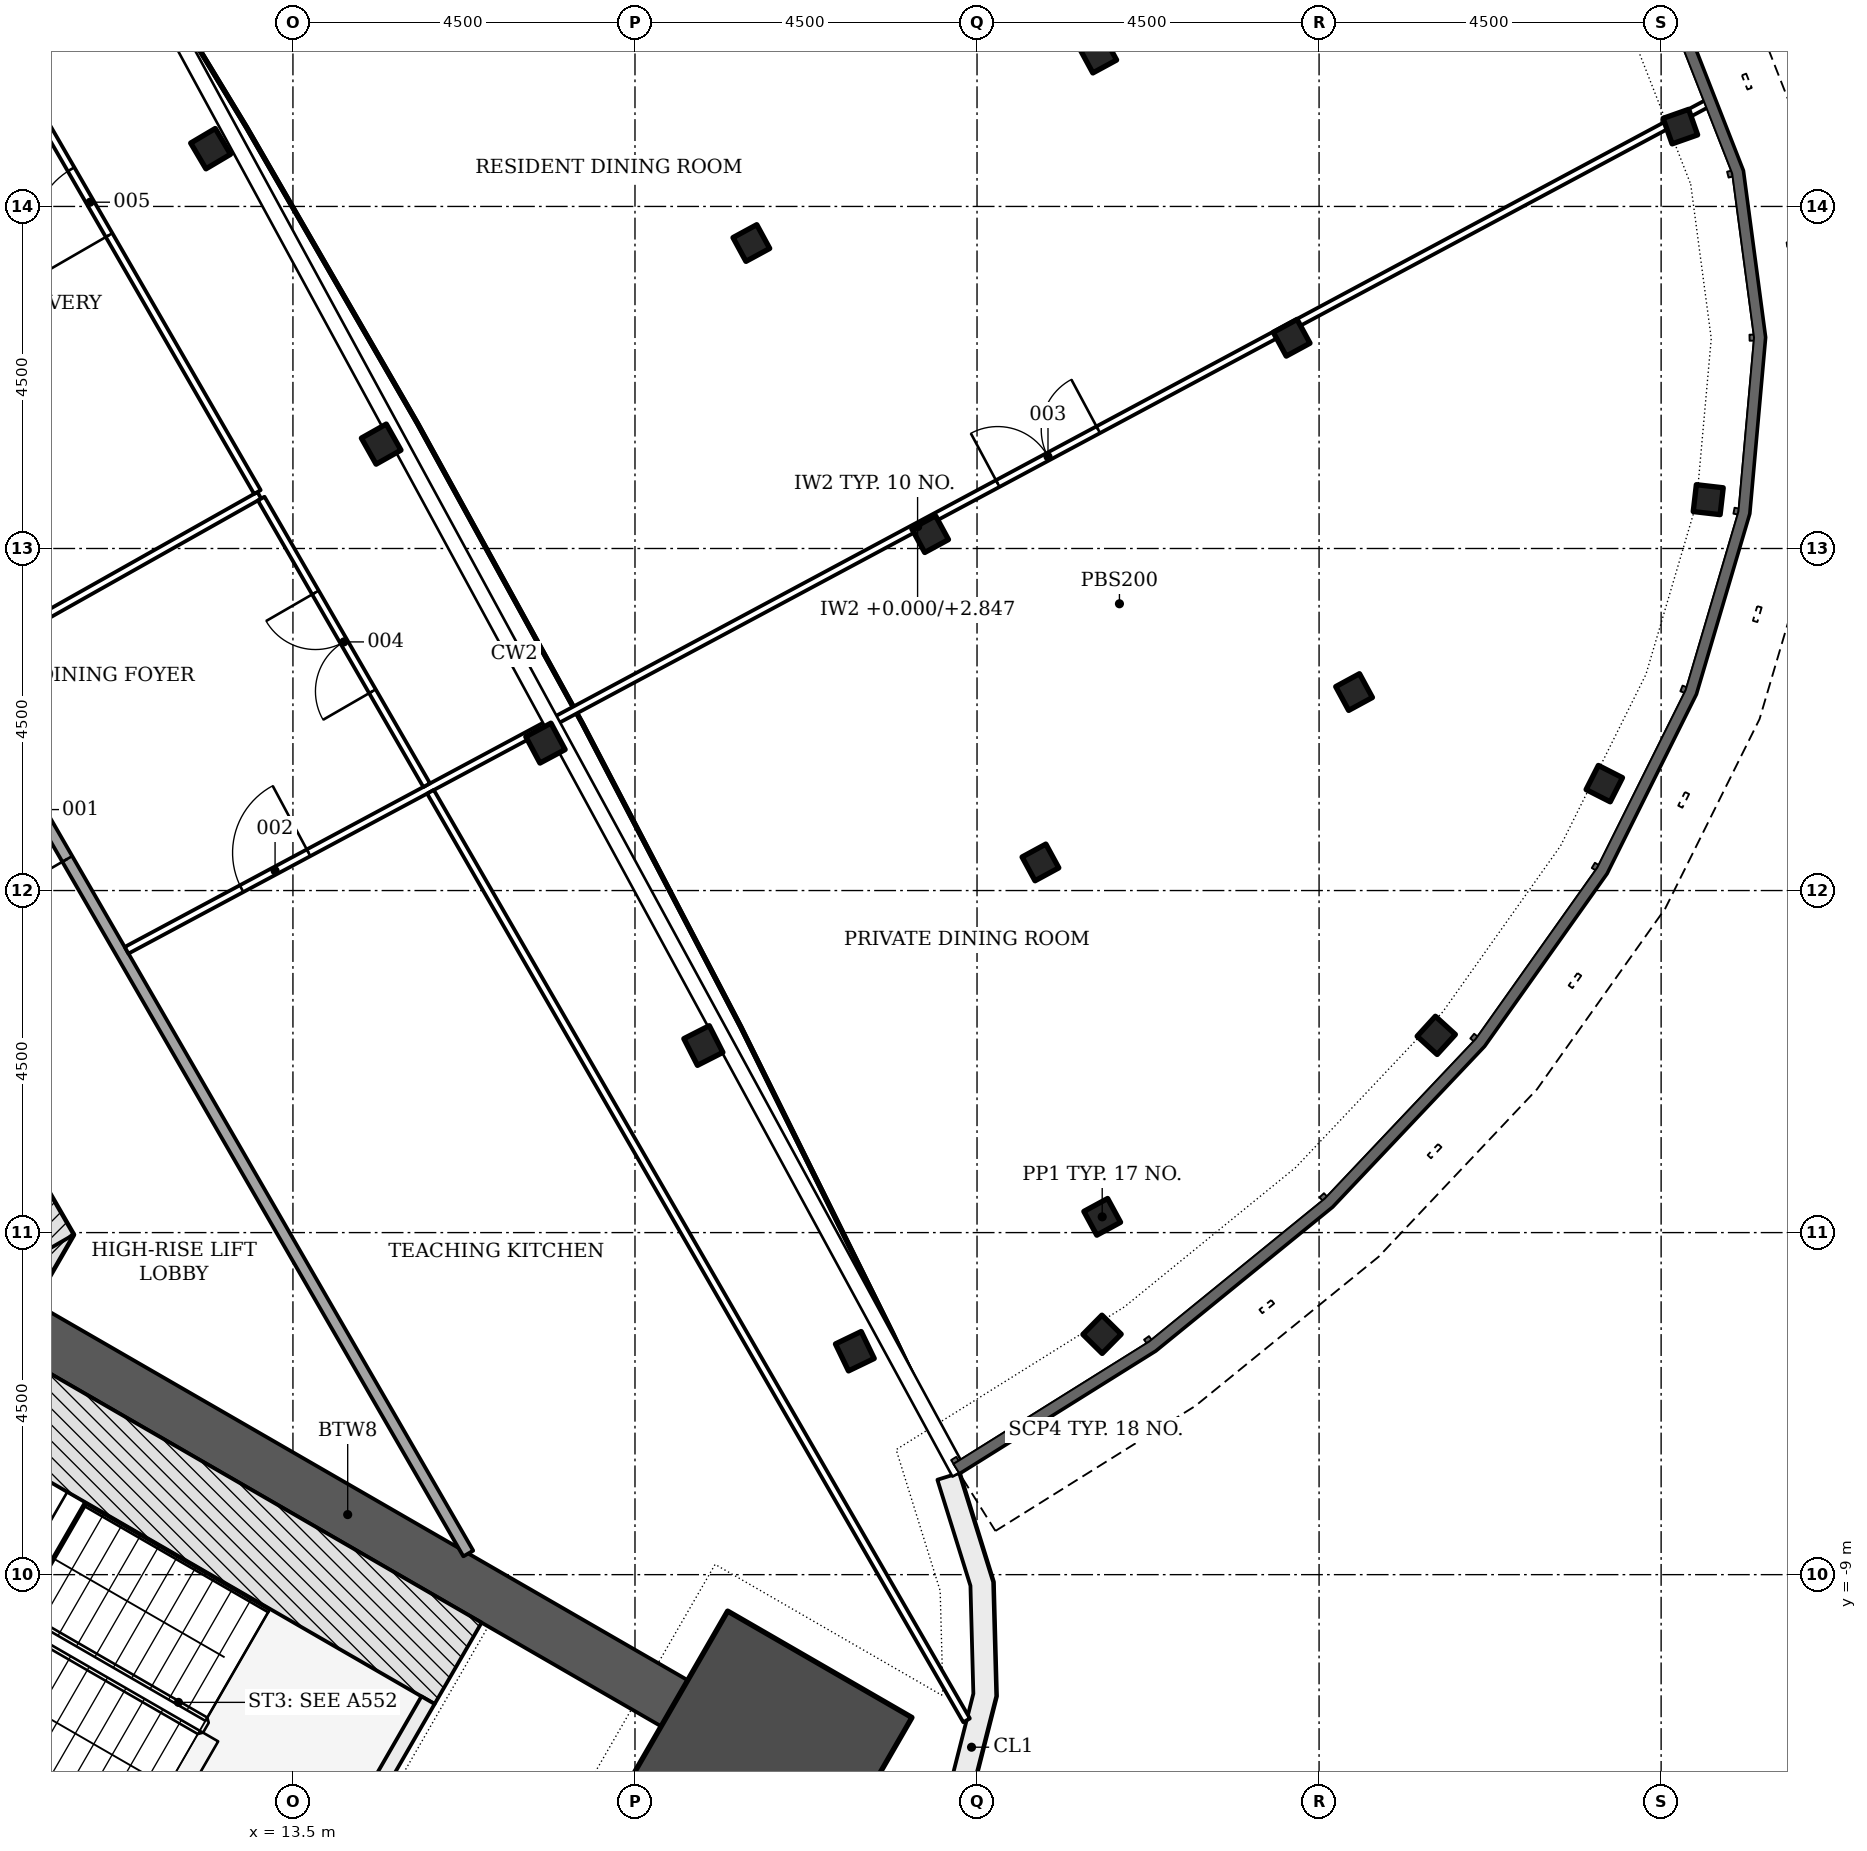
"""IFC4 building model, lengths in metres.
Left out: names, types, materials, properties, quantities, classifications, styles, units other than length and angle.
Written with IfcOpenShell. Run it as: python <this file> out.ifc"""

import sys

from ifc_helpers import new_model, si_unit, direction, frame, frame_2d, origin, origin_2d, place, context, subcontext, project, spatial, polyline, rectangle, hollow_rectangle, i_section, outline, extrude, element, fill, save


model = new_model("IFC4")
c1 = context("Model", 3, precision=1e-05, world=origin(), true_north=direction((0.0, 1.0)))
c2 = subcontext(c1, "Body", "Model", "MODEL_VIEW")
j1 = project(units=[si_unit("LENGTHUNIT", "METRE"), si_unit("PLANEANGLEUNIT", "RADIAN")], contexts=[c1])
p1 = place(None, origin())
s1 = spatial("IfcSite", under=j1, at=p1, CompositionType="ELEMENT")
p2 = place(p1, origin())
s2 = spatial("IfcBuilding", under=s1, at=p2, CompositionType="ELEMENT")
p3 = place(p2, frame((0.0, 0.0, 174.3)))
s3 = spatial("IfcBuildingStorey", under=s2, at=p3, CompositionType="ELEMENT", Elevation=174.3)
p4 = place(p3, frame((8.926, -6.753, -0.2), z_axis=(0.0, 0.0, 1.0), x_axis=(0.500042739161, 0.866000726912, 0.0)))
e1 = element("IfcWall", 1, at=p4, inside=s3, PredefinedType="SHEAR", context=c2, shape_type="SweptSolid", body=[
    extrude(rectangle(XDim=2.771, YDim=0.7, at=frame_2d((1.386, 0.0))), origin(), (0.0, 0.0, 1.0), 3.6),
])
p5 = place(p3, frame((10.311, -4.703, -0.2), z_axis=(0.0, 0.0, 1.0), x_axis=(-0.500001446645, 0.866024568562, 0.0)))
e2 = element("IfcWall", 2, at=p5, inside=s3, PredefinedType="SHEAR", context=c2, shape_type="SweptSolid", body=[
    extrude(rectangle(XDim=18.458, YDim=0.7, at=frame_2d((9.229, 0.0))), origin(), (0.0, 0.0, 1.0), 3.6),
])
p6 = place(p5, frame((4.379, 0.0, 0.2)))
e3 = element("IfcOpeningElement", 3, at=p6, cuts=e2, PredefinedType="OPENING", context=c2, shape_type="SweptSolid", body=[
    extrude(rectangle(XDim=1.1, YDim=2.1, at=frame_2d((0.55, 1.05))), frame((0.0, 0.36, 0.0), z_axis=(0.0, -1.0, 0.0), x_axis=(1.0, 0.0, 0.0)), (0.0, 0.0, 1.0), 0.72),
])
p7 = place(p5, frame((6.529, 0.0, 0.2)))
e4 = element("IfcOpeningElement", 4, at=p7, cuts=e2, PredefinedType="OPENING", context=c2, shape_type="SweptSolid", body=[
    extrude(rectangle(XDim=1.1, YDim=2.1, at=frame_2d((0.55, 1.05))), frame((0.0, 0.36, 0.0), z_axis=(0.0, -1.0, 0.0), x_axis=(1.0, 0.0, 0.0)), (0.0, 0.0, 1.0), 0.72),
])
p8 = place(p5, frame((8.679, 0.0, 0.2)))
e5 = element("IfcOpeningElement", 5, at=p8, cuts=e2, PredefinedType="OPENING", context=c2, shape_type="SweptSolid", body=[
    extrude(rectangle(XDim=1.1, YDim=2.1, at=frame_2d((0.55, 1.05))), frame((0.0, 0.36, 0.0), z_axis=(0.0, -1.0, 0.0), x_axis=(1.0, 0.0, 0.0)), (0.0, 0.0, 1.0), 0.72),
])
p9 = place(p5, frame((10.829, 0.0, 0.2)))
e6 = element("IfcOpeningElement", 6, at=p9, cuts=e2, PredefinedType="OPENING", context=c2, shape_type="SweptSolid", body=[
    extrude(rectangle(XDim=1.1, YDim=2.1, at=frame_2d((0.55, 1.05))), frame((0.0, 0.36, 0.0), z_axis=(0.0, -1.0, 0.0), x_axis=(1.0, 0.0, 0.0)), (0.0, 0.0, 1.0), 0.72),
])
p10 = place(p5, frame((12.979, 0.0, 0.2)))
e7 = element("IfcOpeningElement", 7, at=p10, cuts=e2, PredefinedType="OPENING", context=c2, shape_type="SweptSolid", body=[
    extrude(rectangle(XDim=1.1, YDim=2.1, at=frame_2d((0.55, 1.05))), frame((0.0, 0.36, 0.0), z_axis=(0.0, -1.0, 0.0), x_axis=(1.0, 0.0, 0.0)), (0.0, 0.0, 1.0), 0.72),
])
p11 = place(p3, frame((9.922, -5.728, -0.2), z_axis=(0.0, 0.0, 1.0), x_axis=(0.866029553954, -0.499992811627, 0.0)))
e8 = element("IfcWall", 8, at=p11, inside=s3, PredefinedType="SHEAR", context=c2, shape_type="SweptSolid", body=[
    extrude(rectangle(XDim=9.927, YDim=0.7, at=frame_2d((4.964, 0.0))), origin(), (0.0, 0.0, 1.0), 3.6),
])
p12 = place(p3, frame((19.731, -11.392, -0.2), z_axis=(0.0, 0.0, 1.0), x_axis=(0.866025403784, -0.5, 0.0)))
e9 = element("IfcColumn", 9, at=p12, inside=s3, PredefinedType="COLUMN", context=c2, shape_type="SweptSolid", body=[
    extrude(rectangle(XDim=2.8, YDim=2.8, at=origin_2d()), origin(), (0.0, 0.0, 1.0), 3.6),
])
for number, where, z_axis, x_axis in (
    (10, (20.893, -6.061, -0.2), (0.0, 0.0, 1.0), (-0.434, 0.901, 0.0)),
    (11, (18.9, -2.039, -0.2), (0.0, 0.0, 1.0), (-0.453, 0.891, 0.0)),
    (12, (16.822, 1.939, -0.2), (0.0, 0.0, 1.0), (-0.472, 0.881, 0.0)),
    (13, (14.661, 5.873, -0.2), (0.0, 0.0, 1.0), (-0.491, 0.871, 0.0)),
    (14, (12.417, 9.76, -0.2), (0.0, 0.0, 1.0), (-0.509, 0.861, 0.0)),
):
    element("IfcColumn", number, at=place(p3, frame(where, z_axis=z_axis, x_axis=x_axis)), inside=s3, PredefinedType="COLUMN", context=c2, shape_type="SweptSolid", body=[
        extrude(i_section(OverallWidth=0.394, OverallDepth=0.376, WebThickness=0.017, FlangeThickness=0.028, FilletRadius=0.015, at=origin_2d()), origin(), (0.0, 0.0, 1.0), 3.6),
    ])
for number, where, z_axis, x_axis in (
    (15, (24.147, -4.293, -0.2), (0.0, 0.0, 1.0), (0.879, 0.477, 0.0)),
    (16, (23.334, 0.37, -0.2), (0.0, 0.0, 1.0), (0.879, 0.477, 0.0)),
    (17, (27.46, 2.611, -0.2), (0.0, 0.0, 1.0), (0.879, 0.477, 0.0)),
    (18, (21.883, 4.689, -0.2), (0.0, 0.0, 1.0), (0.879, 0.477, 0.0)),
    (19, (26.639, 7.272, -0.2), (0.0, 0.0, 1.0), (0.879, 0.477, 0.0)),
    (20, (19.531, 8.519, -0.2), (0.0, 0.0, 1.0), (0.879, 0.477, 0.0)),
    (21, (24.095, 10.998, -0.2), (0.0, 0.0, 1.0), (0.879, 0.477, 0.0)),
    (22, (24.145, -5.838, -0.2), (0.0, 0.0, 1.0), (0.703, 0.711, 0.0)),
    (23, (28.542, -1.905, -0.2), (0.0, 0.0, 1.0), (0.674, 0.739, 0.0)),
    (24, (30.752, 1.406, -0.2), (0.0, 0.0, 1.0), (0.453, 0.892, 0.0)),
    (25, (32.12, 5.142, -0.2), (0.0, 0.0, 1.0), (0.115, 0.993, 0.0)),
    (26, (31.753, 10.05, -0.2), (0.0, 0.0, 1.0), (-0.332, 0.943, 0.0)),
):
    element("IfcColumn", number, at=place(p3, frame(where, z_axis=z_axis, x_axis=x_axis)), inside=s3, PredefinedType="COLUMN", context=c2, shape_type="SweptSolid", body=[
        extrude(hollow_rectangle(XDim=0.356, YDim=0.356, WallThickness=0.013, at=origin_2d()), origin(), (0.0, 0.0, 1.0), 3.6),
    ])
p13 = place(p3, origin())
e27 = element("IfcWall", 27, at=p13, inside=s3, PredefinedType="NOTDEFINED", context=c2, shape_type="SweptSolid", body=[
    extrude(outline(polyline([(15.736, -15.612), (17.768, -15.451), (19.234, -15.121), (20.555, -14.405), (21.632, -13.357), (22.383, -12.055), (22.753, -10.599), (22.712, -9.097), (22.265, -7.662), (21.979, -7.751), (22.413, -9.146), (22.452, -10.565), (22.103, -11.941), (21.393, -13.171), (20.376, -14.161), (19.128, -14.837), (17.723, -15.154), (15.712, -15.312), (15.736, -15.612)])), origin(), (0.0, 0.0, 1.0), 3.3),
])
p14 = place(p3, frame((7.304, -10.262, -0.2), z_axis=(0.0, 0.0, 1.0), x_axis=(0.866026594901, -0.49999793692, 0.0)))
e28 = element("IfcWall", 28, at=p14, inside=s3, PredefinedType="SHEAR", context=c2, shape_type="SweptSolid", body=[
    extrude(rectangle(XDim=5.6, YDim=0.2, at=frame_2d((2.8, 0.0))), origin(), (0.0, 0.0, 1.0), 3.6),
])
p15 = place(p14, frame((0.45, 0.0, 0.2)))
e29 = element("IfcOpeningElement", 29, at=p15, cuts=e28, PredefinedType="OPENING", context=c2, shape_type="SweptSolid", body=[
    extrude(rectangle(XDim=1.2, YDim=2.1, at=frame_2d((0.6, 1.05))), frame((0.0, 0.11, 0.0), z_axis=(0.0, -1.0, 0.0), x_axis=(1.0, 0.0, 0.0)), (0.0, 0.0, 1.0), 0.22),
])
p16 = place(p3, frame((9.438, -6.566, -0.2), z_axis=(0.0, 0.0, 1.0), x_axis=(0.866026919366, -0.499997374926, 0.0)))
e30 = element("IfcWall", 30, at=p16, inside=s3, PredefinedType="SHEAR", context=c2, shape_type="SweptSolid", body=[
    extrude(rectangle(XDim=7.2, YDim=1.236, at=frame_2d((3.6, 0.0))), origin(), (0.0, 0.0, 1.0), 3.6),
])
p17 = place(p3, frame((0.0, 0.0, -0.2)))
e31 = element("IfcWall", 31, at=p17, inside=s3, PredefinedType="SHEAR", context=c2, shape_type="SweptSolid", body=[
    extrude(outline(polyline([(12.104, -13.149), (14.289, -12.563), (15.364, -10.701), (15.191, -10.601), (14.157, -12.392), (12.132, -12.934), (12.204, -12.976), (12.204, -12.976), (12.204, -12.976), (12.204, -12.976), (12.204, -12.976), (12.204, -12.976), (12.204, -12.976), (12.204, -12.976), (12.204, -12.976), (12.204, -12.976), (12.204, -12.976), (12.204, -12.976), (12.204, -12.976), (12.204, -12.976), (12.204, -12.976), (12.204, -12.976), (12.204, -12.976), (12.104, -13.149)])), origin(), (0.0, 0.0, 1.0), 3.6),
])
p18 = place(p3, frame((15.807, -8.722, 0.0), z_axis=(0.0, 0.0, 1.0), x_axis=(-0.500001078133, 0.866024781323, 0.0)))
e32 = element("IfcWall", 32, at=p18, inside=s3, PredefinedType="PARTITIONING", context=c2, shape_type="SweptSolid", body=[
    extrude(rectangle(XDim=23.185, YDim=0.15, at=frame_2d((11.592, 0.0))), origin(), (0.0, 0.0, 1.0), 2.847),
])
p19 = place(p18, frame((10.551, 0.0, 0.0)))
e33 = element("IfcOpeningElement", 33, at=p19, cuts=e32, PredefinedType="OPENING", context=c2, shape_type="SweptSolid", body=[
    extrude(rectangle(XDim=1.5, YDim=2.1, at=frame_2d((0.75, 1.05))), frame((0.0, 0.085, 0.0), z_axis=(0.0, -1.0, 0.0), x_axis=(1.0, 0.0, 0.0)), (0.0, 0.0, 1.0), 0.17),
])
p20 = place(p18, frame((17.335, 0.0, 0.0)))
e34 = element("IfcOpeningElement", 34, at=p20, cuts=e32, PredefinedType="OPENING", context=c2, shape_type="SweptSolid", body=[
    extrude(rectangle(XDim=1.0, YDim=2.1, at=frame_2d((0.5, 1.05))), frame((0.0, 0.085, 0.0), z_axis=(0.0, -1.0, 0.0), x_axis=(1.0, 0.0, 0.0)), (0.0, 0.0, 1.0), 0.17),
])
p21 = place(p3, frame((11.312, -0.786, 0.0), z_axis=(0.0, 0.0, 1.0), x_axis=(0.881471822947, 0.472236620087, 0.0)))
e35 = element("IfcWall", 35, at=p21, inside=s3, PredefinedType="PARTITIONING", context=c2, shape_type="SweptSolid", body=[
    extrude(rectangle(XDim=23.611, YDim=0.1, at=frame_2d((11.806, 0.0))), origin(), (0.0, 0.0, 1.0), 2.847),
])
p22 = place(p21, frame((1.716, 0.0, 0.0)))
e36 = element("IfcOpeningElement", 36, at=p22, cuts=e35, PredefinedType="OPENING", context=c2, shape_type="SweptSolid", body=[
    extrude(rectangle(XDim=1.0, YDim=2.1, at=frame_2d((0.5, 1.05))), frame((0.0, 0.06, 0.0), z_axis=(0.0, -1.0, 0.0), x_axis=(1.0, 0.0, 0.0)), (0.0, 0.0, 1.0), 0.12),
])
p23 = place(p21, frame((13.002, 0.0, 0.0)))
e37 = element("IfcOpeningElement", 37, at=p23, cuts=e35, PredefinedType="OPENING", context=c2, shape_type="SweptSolid", body=[
    extrude(rectangle(XDim=1.5, YDim=2.1, at=frame_2d((0.75, 1.05))), frame((0.0, 0.06, 0.0), z_axis=(0.0, -1.0, 0.0), x_axis=(1.0, 0.0, 0.0)), (0.0, 0.0, 1.0), 0.12),
])
p24 = place(p3, frame((9.133, 2.989, 0.0), z_axis=(0.0, 0.0, 1.0), x_axis=(0.871281573597, 0.490783475181, 0.0)))
e38 = element("IfcWall", 38, at=p24, inside=s3, PredefinedType="PARTITIONING", context=c2, shape_type="SweptSolid", body=[
    extrude(rectangle(XDim=4.505, YDim=0.1, at=frame_2d((2.252, 0.0))), origin(), (0.0, 0.0, 1.0), 3.4),
])
p25 = place(p3, frame((22.363, -10.917, 0.0), z_axis=(0.0, 0.0, 1.0), x_axis=(-0.500007103281, 0.866021302664, 0.0)))
e39 = element("IfcWall", 39, at=p25, inside=s3, PredefinedType="PARTITIONING", context=c2, shape_type="SweptSolid", body=[
    extrude(rectangle(XDim=14.106, YDim=0.1, at=frame_2d((7.053, 0.0))), origin(), (0.0, 0.0, 1.0), 2.847),
])
p26 = place(p3, frame((15.259, 1.386, 0.0), z_axis=(0.0, 0.0, 1.0), x_axis=(-0.499999150107, 0.86602589447, 0.0)))
e40 = element("IfcWall", 40, at=p26, inside=s3, PredefinedType="PARTITIONING", context=c2, shape_type="SweptSolid", body=[
    extrude(rectangle(XDim=4.354, YDim=0.1, at=frame_2d((2.177, 0.0))), origin(), (0.0, 0.0, 1.0), 2.847),
])
p27 = place(p26, frame((1.427, 0.0, 0.0)))
e41 = element("IfcOpeningElement", 41, at=p27, cuts=e40, PredefinedType="OPENING", context=c2, shape_type="SweptSolid", body=[
    extrude(rectangle(XDim=1.5, YDim=2.1, at=frame_2d((0.75, 1.05))), frame((0.0, 0.06, 0.0), z_axis=(0.0, -1.0, 0.0), x_axis=(1.0, 0.0, 0.0)), (0.0, 0.0, 1.0), 0.12),
])
p28 = place(p3, frame((13.032, 5.243, 0.0), z_axis=(0.0, 0.0, 1.0), x_axis=(-0.499996840937, 0.866027227663, 0.0)))
e42 = element("IfcWall", 42, at=p28, inside=s3, PredefinedType="PARTITIONING", context=c2, shape_type="SweptSolid", body=[
    extrude(rectangle(XDim=8.78, YDim=0.1, at=frame_2d((4.39, 0.0))), origin(), (0.0, 0.0, 1.0), 2.847),
])
p29 = place(p28, frame((3.903, 0.0, 0.0)))
e43 = element("IfcOpeningElement", 43, at=p29, cuts=e42, PredefinedType="OPENING", context=c2, shape_type="SweptSolid", body=[
    extrude(rectangle(XDim=1.0, YDim=2.1, at=frame_2d((0.5, 1.05))), frame((0.0, 0.06, 0.0), z_axis=(0.0, -1.0, 0.0), x_axis=(1.0, 0.0, 0.0)), (0.0, 0.0, 1.0), 0.12),
])
p30 = place(p19, origin())
e44 = element("IfcDoor", 44, at=p30, inside=s3, OperationType="DOUBLE_DOOR_SINGLE_SWING", PredefinedType="DOOR", context=c2, shape_type="SweptSolid", body=[
    extrude(rectangle(XDim=1.5, YDim=2.1, at=frame_2d((0.75, 1.05))), frame((0.0, 0.025, 0.0), z_axis=(0.0, -1.0, 0.0), x_axis=(1.0, 0.0, 0.0)), (0.0, 0.0, 1.0), 0.05),
])
fill(e33, e44)
p31 = place(p22, origin())
e45 = element("IfcDoor", 45, at=p31, inside=s3, OperationType="SINGLE_SWING_RIGHT", PredefinedType="DOOR", context=c2, shape_type="SweptSolid", body=[
    extrude(rectangle(XDim=1.0, YDim=2.1, at=frame_2d((0.5, 1.05))), frame((0.0, 0.025, 0.0), z_axis=(0.0, -1.0, 0.0), x_axis=(1.0, 0.0, 0.0)), (0.0, 0.0, 1.0), 0.05),
])
fill(e36, e45)
p32 = place(p23, origin())
e46 = element("IfcDoor", 46, at=p32, inside=s3, OperationType="DOUBLE_DOOR_SINGLE_SWING", PredefinedType="DOOR", context=c2, shape_type="SweptSolid", body=[
    extrude(rectangle(XDim=1.5, YDim=2.1, at=frame_2d((0.75, 1.05))), frame((0.0, 0.025, 0.0), z_axis=(0.0, -1.0, 0.0), x_axis=(1.0, 0.0, 0.0)), (0.0, 0.0, 1.0), 0.05),
])
fill(e37, e46)
p33 = place(p27, origin())
e47 = element("IfcDoor", 47, at=p33, inside=s3, OperationType="DOUBLE_DOOR_SINGLE_SWING", PredefinedType="DOOR", context=c2, shape_type="SweptSolid", body=[
    extrude(rectangle(XDim=1.5, YDim=2.1, at=frame_2d((0.75, 1.05))), frame((0.0, 0.025, 0.0), z_axis=(0.0, -1.0, 0.0), x_axis=(1.0, 0.0, 0.0)), (0.0, 0.0, 1.0), 0.05),
])
fill(e41, e47)
p34 = place(p29, origin())
e48 = element("IfcDoor", 48, at=p34, inside=s3, OperationType="SINGLE_SWING_LEFT", PredefinedType="DOOR", context=c2, shape_type="SweptSolid", body=[
    extrude(rectangle(XDim=1.0, YDim=2.1, at=frame_2d((0.5, 1.05))), frame((0.0, 0.025, 0.0), z_axis=(0.0, -1.0, 0.0), x_axis=(1.0, 0.0, 0.0)), (0.0, 0.0, 1.0), 0.05),
])
fill(e43, e48)
save(model, sys.argv[1])
